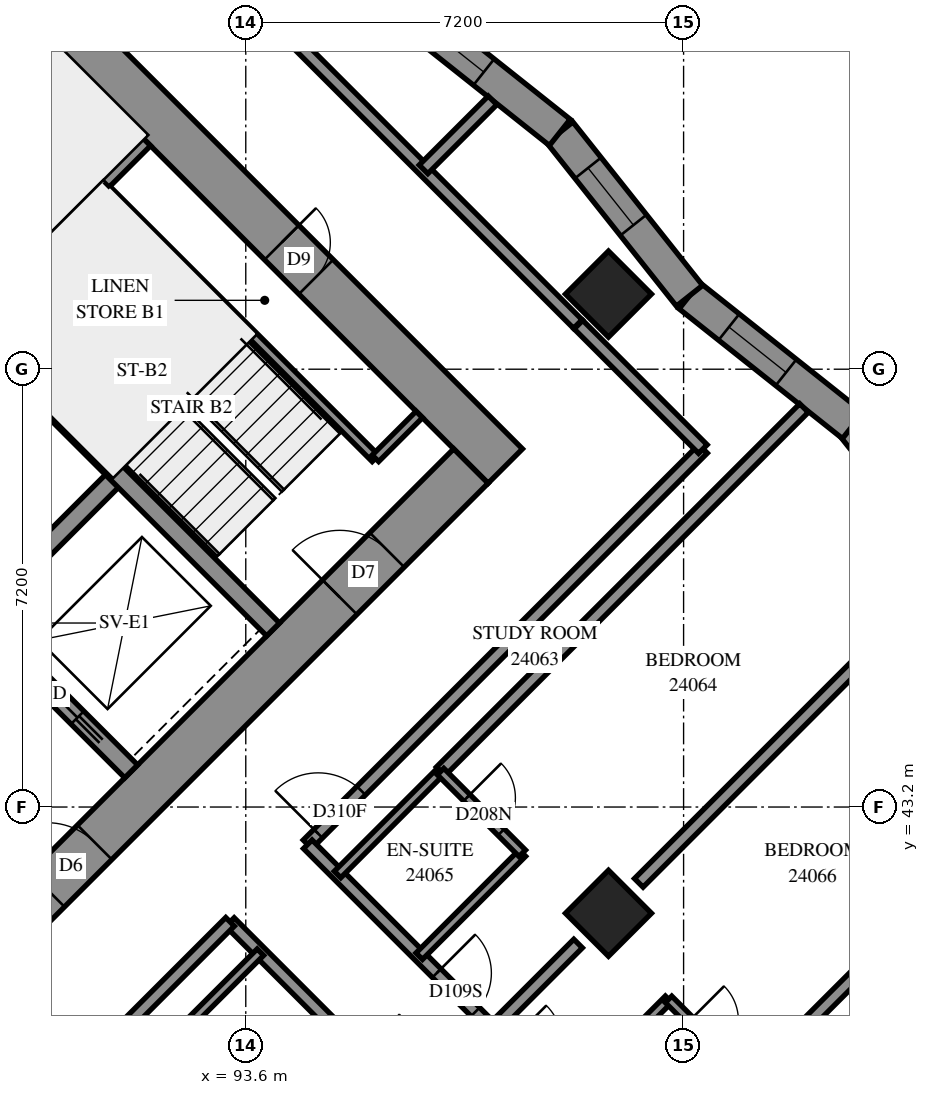
"""IFC4 building model, lengths in metres.
Left out: names, types, materials, properties, quantities, classifications, styles, units other than length and angle.
Written with IfcOpenShell. Run it as: python <this file> out.ifc"""

import sys

from ifc_helpers import new_model, si_unit, direction, frame, frame_2d, origin, origin_2d, place, context, subcontext, project, spatial, polyline, rectangle, outline, extrude, element, fill, save


model = new_model("IFC4")
c1 = context("Model", 3, precision=1e-05, world=origin(), true_north=direction((0.0, 1.0)))
c2 = subcontext(c1, "Body", "Model", "MODEL_VIEW")
j1 = project(units=[si_unit("LENGTHUNIT", "METRE"), si_unit("PLANEANGLEUNIT", "RADIAN")], contexts=[c1])
p1 = place(None, origin())
s1 = spatial("IfcSite", under=j1, at=p1, CompositionType="ELEMENT")
p2 = place(p1, origin())
s2 = spatial("IfcBuilding", under=s1, at=p2, CompositionType="ELEMENT")
p3 = place(p2, frame((0.0, 0.0, 91.4)))
s3 = spatial("IfcBuildingStorey", under=s2, at=p3, CompositionType="ELEMENT", Elevation=91.4)
for number, where, z_axis, x_axis in (
    (1, (99.565, 51.635, 0.0), (0.0, 0.0, 1.0), (0.707, -0.707, 0.0)),
    (2, (99.565, 41.453, 0.0), (0.0, 0.0, 1.0), (0.707, -0.707, 0.0)),
):
    element("IfcColumn", number, at=place(p3, frame(where, z_axis=z_axis, x_axis=x_axis)), inside=s3, PredefinedType="COLUMN", context=c2, shape_type="SweptSolid", body=[
        extrude(rectangle(XDim=1.0, YDim=1.0, at=origin_2d()), origin(), (0.0, 0.0, 1.0), 3.1),
    ])
p4 = place(p3, frame((86.554, 60.121, -0.3), z_axis=(0.0, 0.0, 1.0), x_axis=(0.7071067812, -0.7071067812, 0.0)))
e3 = element("IfcWall", 3, at=p4, inside=s3, PredefinedType="SHEAR", context=c2, shape_type="SweptSolid", body=[
    extrude(rectangle(XDim=16.0, YDim=0.8, at=frame_2d((8.0, 0.0))), origin(), (0.0, 0.0, 1.0), 2.7),
])
p5 = place(p4, frame((10.8, 0.0, 0.3)))
e4 = element("IfcOpeningElement", 4, at=p5, cuts=e3, PredefinedType="OPENING", context=c2, shape_type="SweptSolid", body=[
    extrude(rectangle(XDim=0.8, YDim=2.1, at=frame_2d((0.4, 1.05))), frame((0.0, 0.41, 0.0), z_axis=(0.0, -1.0, 0.0), x_axis=(1.0, 0.0, 0.0)), (0.0, 0.0, 1.0), 0.82),
])
p6 = place(p3, frame((87.12, 38.625, -0.3), z_axis=(0.0, 0.0, 1.0), x_axis=(0.7071067812, 0.7071067812, 0.0)))
e5 = element("IfcWall", 5, at=p6, inside=s3, PredefinedType="SHEAR", context=c2, shape_type="SweptSolid", body=[
    extrude(rectangle(XDim=14.4, YDim=0.8, at=frame_2d((7.2, 0.0))), origin(), (0.0, 0.0, 1.0), 2.7),
])
p7 = place(p6, frame((4.55, 0.0, 0.3)))
e6 = element("IfcOpeningElement", 6, at=p7, cuts=e5, PredefinedType="OPENING", context=c2, shape_type="SweptSolid", body=[
    extrude(rectangle(XDim=1.1, YDim=2.1, at=frame_2d((0.55, 1.05))), frame((0.0, 0.41, 0.0), z_axis=(0.0, -1.0, 0.0), x_axis=(1.0, 0.0, 0.0)), (0.0, 0.0, 1.0), 0.82),
])
p8 = place(p6, frame((11.35, 0.0, 0.3)))
e7 = element("IfcOpeningElement", 7, at=p8, cuts=e5, PredefinedType="OPENING", context=c2, shape_type="SweptSolid", body=[
    extrude(rectangle(XDim=1.1, YDim=2.1, at=frame_2d((0.55, 1.05))), frame((0.0, 0.41, 0.0), z_axis=(0.0, -1.0, 0.0), x_axis=(1.0, 0.0, 0.0)), (0.0, 0.0, 1.0), 0.82),
])
p9 = place(p3, frame((89.17, 46.332, 0.0), z_axis=(0.0, 0.0, 1.0), x_axis=(0.7071067812, 0.7071067812, 0.0)))
e8 = element("IfcWall", 8, at=p9, inside=s3, PredefinedType="SOLIDWALL", context=c2, shape_type="SweptSolid", body=[
    extrude(rectangle(XDim=3.3, YDim=0.3, at=frame_2d((1.65, 0.0))), origin(), (0.0, 0.0, 1.0), 3.1),
])
p10 = place(p3, frame((81.534, 53.969, 0.0), z_axis=(0.0, 0.0, 1.0), x_axis=(0.707103309, -0.7071102534, 0.0)))
e9 = element("IfcWall", 9, at=p10, inside=s3, PredefinedType="SOLIDWALL", context=c2, shape_type="SweptSolid", body=[
    extrude(rectangle(XDim=14.4, YDim=0.3, at=frame_2d((7.2, 0.0))), origin(), (0.0, 0.0, 1.0), 3.1),
])
p11 = place(p10, frame((12.05, 0.0, 0.0)))
e10 = element("IfcOpeningElement", 10, at=p11, cuts=e9, PredefinedType="OPENING", context=c2, shape_type="SweptSolid", body=[
    extrude(rectangle(XDim=1.1, YDim=2.1, at=frame_2d((0.55, 1.05))), frame((0.0, 0.16, 0.0), z_axis=(0.0, -1.0, 0.0), x_axis=(1.0, 0.0, 0.0)), (0.0, 0.0, 1.0), 0.32),
])
p12 = place(p3, frame((88.958, 51.211, 0.0), z_axis=(0.0, 0.0, 1.0), x_axis=(0.7070998367, -0.7071137256, 0.0)))
e11 = element("IfcWall", 11, at=p12, inside=s3, PredefinedType="SOLIDWALL", context=c2, shape_type="SweptSolid", body=[
    extrude(rectangle(XDim=7.2, YDim=0.3, at=frame_2d((3.6, 0.0))), origin(), (0.0, 0.0, 1.0), 3.1),
])
p13 = place(p3, frame((88.958, 51.211, 0.0), z_axis=(0.0, 0.0, 1.0), x_axis=(0.7071067812, 0.7071067812, 0.0)))
e12 = element("IfcWall", 12, at=p13, inside=s3, PredefinedType="SOLIDWALL", context=c2, shape_type="SweptSolid", body=[
    extrude(rectangle(XDim=4.2, YDim=0.3, at=frame_2d((2.1, 0.0))), origin(), (0.0, 0.0, 1.0), 3.1),
])
p14 = place(p3, frame((105.717, 46.789, 0.0), z_axis=(0.0, 0.0, 1.0), x_axis=(-0.621900023, 0.7830966489, 0.0)))
e13 = element("IfcWall", 13, at=p14, inside=s3, PredefinedType="SOLIDWALL", context=c2, shape_type="SweptSolid", body=[
    extrude(outline(polyline([(0.032, -0.275), (3.462, -0.275), (3.398, 0.275), (-0.032, 0.275), (0.032, -0.275)])), origin(), (0.0, 0.0, 1.0), 3.1),
])
p15 = place(p14, frame((1.29, 0.0, 0.5)))
e14 = element("IfcOpeningElement", 14, at=p15, cuts=e13, PredefinedType="OPENING", context=c2, shape_type="SweptSolid", body=[
    extrude(rectangle(XDim=1.2, YDim=2.45, at=frame_2d((0.6, 1.225))), frame((0.0, 0.285, 0.0), z_axis=(0.0, -1.0, 0.0), x_axis=(1.0, 0.0, 0.0)), (0.0, 0.0, 1.0), 0.57),
])
p16 = place(p3, frame((103.584, 49.475, 0.0), z_axis=(0.0, 0.0, 1.0), x_axis=(-0.7830937263, 0.6219037031, 0.0)))
e15 = element("IfcWall", 15, at=p16, inside=s3, PredefinedType="SOLIDWALL", context=c2, shape_type="SweptSolid", body=[
    extrude(outline(polyline([(-0.032, -0.275), (3.398, -0.275), (3.462, 0.275), (0.032, 0.275), (-0.032, -0.275)])), origin(), (0.0, 0.0, 1.0), 3.1),
])
p17 = place(p16, frame((1.402, 0.0, 0.5)))
e16 = element("IfcOpeningElement", 16, at=p17, cuts=e15, PredefinedType="OPENING", context=c2, shape_type="SweptSolid", body=[
    extrude(rectangle(XDim=1.2, YDim=2.45, at=frame_2d((0.6, 1.225))), frame((0.0, 0.285, 0.0), z_axis=(0.0, -1.0, 0.0), x_axis=(1.0, 0.0, 0.0)), (0.0, 0.0, 1.0), 0.57),
])
p18 = place(p3, frame((100.897, 51.608, 0.0), z_axis=(0.0, 0.0, 1.0), x_axis=(-0.621900023, 0.7830966489, 0.0)))
e17 = element("IfcWall", 17, at=p18, inside=s3, PredefinedType="SOLIDWALL", context=c2, shape_type="SweptSolid", body=[
    extrude(outline(polyline([(0.032, -0.275), (3.462, -0.275), (3.398, 0.275), (-0.032, 0.275), (0.032, -0.275)])), origin(), (0.0, 0.0, 1.0), 3.1),
])
p19 = place(p18, frame((1.483, 0.0, 0.5)))
e18 = element("IfcOpeningElement", 18, at=p19, cuts=e17, PredefinedType="OPENING", context=c2, shape_type="SweptSolid", body=[
    extrude(rectangle(XDim=1.2, YDim=2.45, at=frame_2d((0.6, 1.225))), frame((0.0, 0.285, 0.0), z_axis=(0.0, -1.0, 0.0), x_axis=(1.0, 0.0, 0.0)), (0.0, 0.0, 1.0), 0.57),
])
p20 = place(p3, frame((98.764, 54.294, 0.0), z_axis=(0.0, 0.0, 1.0), x_axis=(-0.7831079243, 0.6218858246, 0.0)))
e19 = element("IfcWall", 19, at=p20, inside=s3, PredefinedType="SOLIDWALL", context=c2, shape_type="SweptSolid", body=[
    extrude(outline(polyline([(-0.032, -0.275), (3.398, -0.275), (3.462, 0.275), (0.032, 0.275), (-0.032, -0.275)])), origin(), (0.0, 0.0, 1.0), 3.1),
])
p21 = place(p20, frame((1.596, 0.0, 0.5)))
e20 = element("IfcOpeningElement", 20, at=p21, cuts=e19, PredefinedType="OPENING", context=c2, shape_type="SweptSolid", body=[
    extrude(rectangle(XDim=1.2, YDim=2.45, at=frame_2d((0.6, 1.225))), frame((0.0, 0.285, 0.0), z_axis=(0.0, -1.0, 0.0), x_axis=(1.0, 0.0, 0.0)), (0.0, 0.0, 1.0), 0.57),
])
p22 = place(p3, frame((91.313, 53.354, 0.0), z_axis=(0.0, 0.0, 1.0), x_axis=(0.7071147811, -0.7070987812, 0.0)))
e21 = element("IfcWall", 21, at=p22, inside=s3, PredefinedType="PARTITIONING", context=c2, shape_type="SweptSolid", body=[
    extrude(rectangle(XDim=6.25, YDim=0.15, at=frame_2d((3.125, 0.0))), origin(), (0.0, 0.0, 1.0), 3.1),
])
p23 = place(p3, frame((95.732, 48.934, 0.0), z_axis=(0.0, 0.0, 1.0), x_axis=(0.7071067812, 0.7071067812, 0.0)))
e22 = element("IfcWall", 22, at=p23, inside=s3, PredefinedType="PARTITIONING", context=c2, shape_type="SweptSolid", body=[
    extrude(rectangle(XDim=1.02, YDim=0.15, at=frame_2d((0.51, 0.0))), origin(), (0.0, 0.0, 1.0), 3.1),
])
p24 = place(p3, frame((93.339, 41.309, 0.0), z_axis=(0.0, 0.0, 1.0), x_axis=(0.7071067812, -0.7071067812, 0.0)))
e23 = element("IfcWall", 23, at=p24, inside=s3, PredefinedType="PARTITIONING", context=c2, shape_type="SweptSolid", body=[
    extrude(rectangle(XDim=18.702, YDim=0.2, at=frame_2d((9.351, 0.0))), origin(), (0.0, 0.0, 1.0), 3.1),
])
p25 = place(p24, frame((3.05, 0.0, 0.0)))
e24 = element("IfcOpeningElement", 24, at=p25, cuts=e23, PredefinedType="OPENING", context=c2, shape_type="SweptSolid", body=[
    extrude(rectangle(XDim=0.9, YDim=2.1, at=frame_2d((0.45, 1.05))), frame((0.0, 0.11, 0.0), z_axis=(0.0, -1.0, 0.0), x_axis=(1.0, 0.0, 0.0)), (0.0, 0.0, 1.0), 0.22),
])
p26 = place(p24, frame((4.7, 0.0, 0.0)))
e25 = element("IfcOpeningElement", 25, at=p26, cuts=e23, PredefinedType="OPENING", context=c2, shape_type="SweptSolid", body=[
    extrude(rectangle(XDim=0.9, YDim=2.1, at=frame_2d((0.45, 1.05))), frame((0.0, 0.11, 0.0), z_axis=(0.0, -1.0, 0.0), x_axis=(1.0, 0.0, 0.0)), (0.0, 0.0, 1.0), 0.22),
])
p27 = place(p24, frame((10.149, 0.0, 0.0)))
e26 = element("IfcOpeningElement", 26, at=p27, cuts=e23, PredefinedType="OPENING", context=c2, shape_type="SweptSolid", body=[
    extrude(rectangle(XDim=0.9, YDim=2.1, at=frame_2d((0.45, 1.05))), frame((0.0, 0.11, 0.0), z_axis=(0.0, -1.0, 0.0), x_axis=(1.0, 0.0, 0.0)), (0.0, 0.0, 1.0), 0.22),
])
p28 = place(p24, frame((11.9, 0.0, 0.0)))
e27 = element("IfcOpeningElement", 27, at=p28, cuts=e23, PredefinedType="OPENING", context=c2, shape_type="SweptSolid", body=[
    extrude(rectangle(XDim=0.9, YDim=2.1, at=frame_2d((0.45, 1.05))), frame((0.0, 0.11, 0.0), z_axis=(0.0, -1.0, 0.0), x_axis=(1.0, 0.0, 0.0)), (0.0, 0.0, 1.0), 0.22),
])
p29 = place(p24, frame((17.45, 0.0, 0.0)))
e28 = element("IfcOpeningElement", 28, at=p29, cuts=e23, PredefinedType="OPENING", context=c2, shape_type="SweptSolid", body=[
    extrude(rectangle(XDim=0.9, YDim=2.1, at=frame_2d((0.45, 1.05))), frame((0.0, 0.11, 0.0), z_axis=(0.0, -1.0, 0.0), x_axis=(1.0, 0.0, 0.0)), (0.0, 0.0, 1.0), 0.22),
])
p30 = place(p3, frame((86.835, 34.806, 0.0), z_axis=(0.0, 0.0, 1.0), x_axis=(0.7071067812, 0.7071067812, 0.0)))
e29 = element("IfcWall", 29, at=p30, inside=s3, PredefinedType="PARTITIONING", context=c2, shape_type="SweptSolid", body=[
    extrude(rectangle(XDim=9.201, YDim=0.2, at=frame_2d((4.601, 0.0))), origin(), (0.0, 0.0, 1.0), 3.1),
])
p31 = place(p3, frame((94.615, 42.587, 0.0), z_axis=(0.0, 0.0, 1.0), x_axis=(0.7071067812, 0.7071067812, 0.0)))
e30 = element("IfcWall", 30, at=p31, inside=s3, PredefinedType="PARTITIONING", context=c2, shape_type="SweptSolid", body=[
    extrude(rectangle(XDim=9.198, YDim=0.2, at=frame_2d((4.599, 0.0))), origin(), (0.0, 0.0, 1.0), 3.1),
])
p32 = place(p31, frame((0.248, 0.0, 0.0)))
e31 = element("IfcOpeningElement", 31, at=p32, cuts=e30, PredefinedType="OPENING", context=c2, shape_type="SweptSolid", body=[
    extrude(rectangle(XDim=1.0, YDim=2.1, at=frame_2d((0.5, 1.05))), frame((0.0, 0.11, 0.0), z_axis=(0.0, -1.0, 0.0), x_axis=(1.0, 0.0, 0.0)), (0.0, 0.0, 1.0), 0.22),
])
p33 = place(p3, frame((101.896, 38.698, 0.0), z_axis=(0.0, 0.0, 1.0), x_axis=(0.7072304079, 0.7069831328, 0.0)))
e32 = element("IfcWall", 32, at=p33, inside=s3, PredefinedType="PARTITIONING", context=c2, shape_type="SweptSolid", body=[
    extrude(rectangle(XDim=8.493, YDim=0.2, at=frame_2d((4.246, 0.0))), origin(), (0.0, 0.0, 1.0), 3.1),
])
p34 = place(p3, frame((96.805, 43.787, 0.0), z_axis=(0.0, 0.0, 1.0), x_axis=(0.7071126983, 0.707100864, 0.0)))
e33 = element("IfcWall", 33, at=p34, inside=s3, PredefinedType="PARTITIONING", context=c2, shape_type="SweptSolid", body=[
    extrude(rectangle(XDim=8.45, YDim=0.2, at=frame_2d((4.225, 0.0))), origin(), (0.0, 0.0, 1.0), 3.1),
])
p35 = place(p3, frame((94.62, 42.587, 0.0), z_axis=(0.0, 0.0, 1.0), x_axis=(0.7071067812, -0.7071067812, 0.0)))
e34 = element("IfcWall", 34, at=p35, inside=s3, PredefinedType="PARTITIONING", context=c2, shape_type="SweptSolid", body=[
    extrude(rectangle(XDim=7.9, YDim=0.2, at=frame_2d((3.95, 0.0))), origin(), (0.0, 0.0, 1.0), 3.1),
])
p36 = place(p35, frame((2.998, 0.0, 0.0)))
e35 = element("IfcOpeningElement", 35, at=p36, cuts=e34, PredefinedType="OPENING", context=c2, shape_type="SweptSolid", body=[
    extrude(rectangle(XDim=0.9, YDim=2.1, at=frame_2d((0.45, 1.05))), frame((0.0, 0.11, 0.0), z_axis=(0.0, -1.0, 0.0), x_axis=(1.0, 0.0, 0.0)), (0.0, 0.0, 1.0), 0.22),
])
p37 = place(p35, frame((4.649, 0.0, 0.0)))
e36 = element("IfcOpeningElement", 36, at=p37, cuts=e34, PredefinedType="OPENING", context=c2, shape_type="SweptSolid", body=[
    extrude(rectangle(XDim=0.9, YDim=2.1, at=frame_2d((0.45, 1.05))), frame((0.0, 0.11, 0.0), z_axis=(0.0, -1.0, 0.0), x_axis=(1.0, 0.0, 0.0)), (0.0, 0.0, 1.0), 0.22),
])
p38 = place(p3, frame((93.981, 56.223, 0.0), z_axis=(0.0, 0.0, 1.0), x_axis=(0.7071067812, -0.7071067812, 0.0)))
e37 = element("IfcWall", 37, at=p38, inside=s3, PredefinedType="PARTITIONING", context=c2, shape_type="SweptSolid", body=[
    extrude(rectangle(XDim=7.184, YDim=0.2, at=frame_2d((3.592, 0.0))), origin(), (0.0, 0.0, 1.0), 3.1),
])
p39 = place(p3, frame((100.063, 41.953, 0.0), z_axis=(0.0, 0.0, 1.0), x_axis=(0.7071067812, 0.7071067812, 0.0)))
e38 = element("IfcWall", 38, at=p39, inside=s3, PredefinedType="PARTITIONING", context=c2, shape_type="SweptSolid", body=[
    extrude(rectangle(XDim=5.787, YDim=0.2, at=frame_2d((2.893, 0.0))), origin(), (0.0, 0.0, 1.0), 3.1),
])
p40 = place(p3, frame((99.071, 51.133, 0.0), z_axis=(0.0, 0.0, 1.0), x_axis=(0.7071067812, -0.7071067812, 0.0)))
e39 = element("IfcWall", 39, at=p40, inside=s3, PredefinedType="PARTITIONING", context=c2, shape_type="SweptSolid", body=[
    extrude(rectangle(XDim=2.893, YDim=0.2, at=frame_2d((1.447, 0.0))), origin(), (0.0, 0.0, 1.0), 3.1),
])
p41 = place(p3, frame((92.143, 39.117, 0.0), z_axis=(0.0, 0.0, 1.0), x_axis=(0.7075233388, 0.706689978, 0.0)))
e40 = element("IfcWall", 40, at=p41, inside=s3, PredefinedType="PARTITIONING", context=c2, shape_type="SweptSolid", body=[
    extrude(rectangle(XDim=2.4, YDim=0.15, at=frame_2d((1.2, 0.0))), origin(), (0.0, 0.0, 1.0), 3.1),
])
for number, where, z_axis, x_axis in (
    (41, (96.453, 40.747, 0.0), (0.0, 0.0, 1.0), (0.707, 0.707, 0.0)),
    (42, (95.109, 42.091, 0.0), (0.0, 0.0, 1.0), (0.707, 0.707, 0.0)),
    (43, (98.857, 38.343, 0.0), (0.0, 0.0, 1.0), (0.707, 0.707, 0.0)),
):
    element("IfcWall", number, at=place(p3, frame(where, z_axis=z_axis, x_axis=x_axis)), inside=s3, PredefinedType="PARTITIONING", context=c2, shape_type="SweptSolid", body=[
        extrude(rectangle(XDim=2.398, YDim=0.15, at=frame_2d((1.199, 0.0))), origin(), (0.0, 0.0, 1.0), 3.1),
    ])
p42 = place(p3, frame((97.655, 39.545, 0.0), z_axis=(0.0, 0.0, 1.0), x_axis=(0.7071067812, 0.7071067812, 0.0)))
e44 = element("IfcWall", 44, at=p42, inside=s3, PredefinedType="PARTITIONING", context=c2, shape_type="SweptSolid", body=[
    extrude(rectangle(XDim=1.994, YDim=0.2, at=frame_2d((0.997, 0.0))), origin(), (0.0, 0.0, 1.0), 3.1),
])
p43 = place(p3, frame((96.803, 43.783, 0.0), z_axis=(0.0, 0.0, 1.0), x_axis=(0.7071067812, -0.7071067812, 0.0)))
e45 = element("IfcWall", 45, at=p43, inside=s3, PredefinedType="PARTITIONING", context=c2, shape_type="SweptSolid", body=[
    extrude(rectangle(XDim=1.901, YDim=0.15, at=frame_2d((0.95, 0.0))), origin(), (0.0, 0.0, 1.0), 3.1),
])
p44 = place(p43, frame((0.609, 0.0, 0.0)))
e46 = element("IfcOpeningElement", 46, at=p44, cuts=e45, PredefinedType="OPENING", context=c2, shape_type="SweptSolid", body=[
    extrude(rectangle(XDim=0.8, YDim=2.1, at=frame_2d((0.4, 1.05))), frame((0.0, 0.085, 0.0), z_axis=(0.0, -1.0, 0.0), x_axis=(1.0, 0.0, 0.0)), (0.0, 0.0, 1.0), 0.17),
])
p45 = place(p3, frame((100.553, 40.037, 0.0), z_axis=(0.0, 0.0, 1.0), x_axis=(0.7076330979, -0.7065800724, 0.0)))
e47 = element("IfcWall", 47, at=p45, inside=s3, PredefinedType="PARTITIONING", context=c2, shape_type="SweptSolid", body=[
    extrude(rectangle(XDim=1.899, YDim=0.15, at=frame_2d((0.95, 0.0))), origin(), (0.0, 0.0, 1.0), 3.1),
])
p46 = place(p45, frame((0.493, 0.0, 0.0)))
e48 = element("IfcOpeningElement", 48, at=p46, cuts=e47, PredefinedType="OPENING", context=c2, shape_type="SweptSolid", body=[
    extrude(rectangle(XDim=0.8, YDim=2.1, at=frame_2d((0.4, 1.05))), frame((0.0, 0.085, 0.0), z_axis=(0.0, -1.0, 0.0), x_axis=(1.0, 0.0, 0.0)), (0.0, 0.0, 1.0), 0.17),
])
p47 = place(p3, frame((96.523, 53.687, 0.0), z_axis=(0.0, 0.0, 1.0), x_axis=(0.7070756263, 0.7071379347, 0.0)))
e49 = element("IfcWall", 49, at=p47, inside=s3, PredefinedType="PARTITIONING", context=c2, shape_type="SweptSolid", body=[
    extrude(rectangle(XDim=1.605, YDim=0.2, at=frame_2d((0.802, 0.0))), origin(), (0.0, 0.0, 1.0), 3.1),
])
p48 = place(p17, origin())
e50 = element("IfcWindow", 50, at=p48, inside=s3, PartitioningType="SINGLE_PANEL", PredefinedType="WINDOW", context=c2, shape_type="SweptSolid", body=[
    extrude(rectangle(XDim=1.2, YDim=2.45, at=frame_2d((0.6, 1.225))), frame((0.0, 0.155, 0.0), z_axis=(0.0, -1.0, 0.0), x_axis=(1.0, 0.0, 0.0)), (0.0, 0.0, 1.0), 0.06),
])
fill(e16, e50)
p49 = place(p19, origin())
e51 = element("IfcWindow", 51, at=p49, inside=s3, PartitioningType="SINGLE_PANEL", PredefinedType="WINDOW", context=c2, shape_type="SweptSolid", body=[
    extrude(rectangle(XDim=1.2, YDim=2.45, at=frame_2d((0.6, 1.225))), frame((0.0, 0.155, 0.0), z_axis=(0.0, -1.0, 0.0), x_axis=(1.0, 0.0, 0.0)), (0.0, 0.0, 1.0), 0.06),
])
fill(e18, e51)
p50 = place(p21, origin())
e52 = element("IfcWindow", 52, at=p50, inside=s3, PartitioningType="SINGLE_PANEL", PredefinedType="WINDOW", context=c2, shape_type="SweptSolid", body=[
    extrude(rectangle(XDim=1.2, YDim=2.45, at=frame_2d((0.6, 1.225))), frame((0.0, 0.155, 0.0), z_axis=(0.0, -1.0, 0.0), x_axis=(1.0, 0.0, 0.0)), (0.0, 0.0, 1.0), 0.06),
])
fill(e20, e52)
p51 = place(p5, origin())
e53 = element("IfcDoor", 53, at=p51, inside=s3, OperationType="SINGLE_SWING_RIGHT", PredefinedType="DOOR", context=c2, shape_type="SweptSolid", body=[
    extrude(rectangle(XDim=0.8, YDim=2.1, at=frame_2d((0.4, 1.05))), frame((0.0, -0.34, 0.0), z_axis=(0.0, -1.0, 0.0), x_axis=(1.0, 0.0, 0.0)), (0.0, 0.0, 1.0), 0.05),
])
fill(e4, e53)
p52 = place(p7, origin())
e54 = element("IfcDoor", 54, at=p52, inside=s3, OperationType="DOUBLE_DOOR_SINGLE_SWING", PredefinedType="DOOR", context=c2, shape_type="SweptSolid", body=[
    extrude(rectangle(XDim=1.1, YDim=2.1, at=frame_2d((0.55, 1.05))), frame((0.0, 0.025, 0.0), z_axis=(0.0, -1.0, 0.0), x_axis=(1.0, 0.0, 0.0)), (0.0, 0.0, 1.0), 0.05),
])
fill(e6, e54)
p53 = place(p8, origin())
e55 = element("IfcDoor", 55, at=p53, inside=s3, OperationType="SINGLE_SWING_RIGHT", PredefinedType="DOOR", context=c2, shape_type="SweptSolid", body=[
    extrude(rectangle(XDim=1.1, YDim=2.1, at=frame_2d((0.55, 1.05))), frame((0.0, 0.025, 0.0), z_axis=(0.0, -1.0, 0.0), x_axis=(1.0, 0.0, 0.0)), (0.0, 0.0, 1.0), 0.05),
])
fill(e7, e55)
p54 = place(p11, origin())
e56 = element("IfcDoor", 56, at=p54, inside=s3, OperationType="SLIDING_TO_RIGHT", PredefinedType="DOOR", context=c2, shape_type="SweptSolid", body=[
    extrude(rectangle(XDim=1.1, YDim=2.1, at=frame_2d((0.55, 1.05))), frame((0.0, 0.025, 0.0), z_axis=(0.0, -1.0, 0.0), x_axis=(1.0, 0.0, 0.0)), (0.0, 0.0, 1.0), 0.05),
])
fill(e10, e56)
p55 = place(p32, origin())
e57 = element("IfcDoor", 57, at=p55, inside=s3, OperationType="SINGLE_SWING_RIGHT", PredefinedType="DOOR", context=c2, shape_type="SweptSolid", body=[
    extrude(rectangle(XDim=1.0, YDim=2.1, at=frame_2d((0.5, 1.05))), frame((0.0, 0.025, 0.0), z_axis=(0.0, -1.0, 0.0), x_axis=(1.0, 0.0, 0.0)), (0.0, 0.0, 1.0), 0.05),
])
fill(e31, e57)
p56 = place(p36, origin())
e58 = element("IfcDoor", 58, at=p56, inside=s3, OperationType="SINGLE_SWING_RIGHT", PredefinedType="DOOR", context=c2, shape_type="SweptSolid", body=[
    extrude(rectangle(XDim=0.9, YDim=2.1, at=frame_2d((0.45, 1.05))), frame((0.0, 0.025, 0.0), z_axis=(0.0, -1.0, 0.0), x_axis=(1.0, 0.0, 0.0)), (0.0, 0.0, 1.0), 0.05),
])
fill(e35, e58)
p57 = place(p44, origin())
e59 = element("IfcDoor", 59, at=p57, inside=s3, OperationType="SINGLE_SWING_RIGHT", PredefinedType="DOOR", context=c2, shape_type="SweptSolid", body=[
    extrude(rectangle(XDim=0.8, YDim=2.1, at=frame_2d((0.4, 1.05))), frame((0.0, 0.025, 0.0), z_axis=(0.0, -1.0, 0.0), x_axis=(1.0, 0.0, 0.0)), (0.0, 0.0, 1.0), 0.05),
])
fill(e46, e59)
save(model, sys.argv[1])
